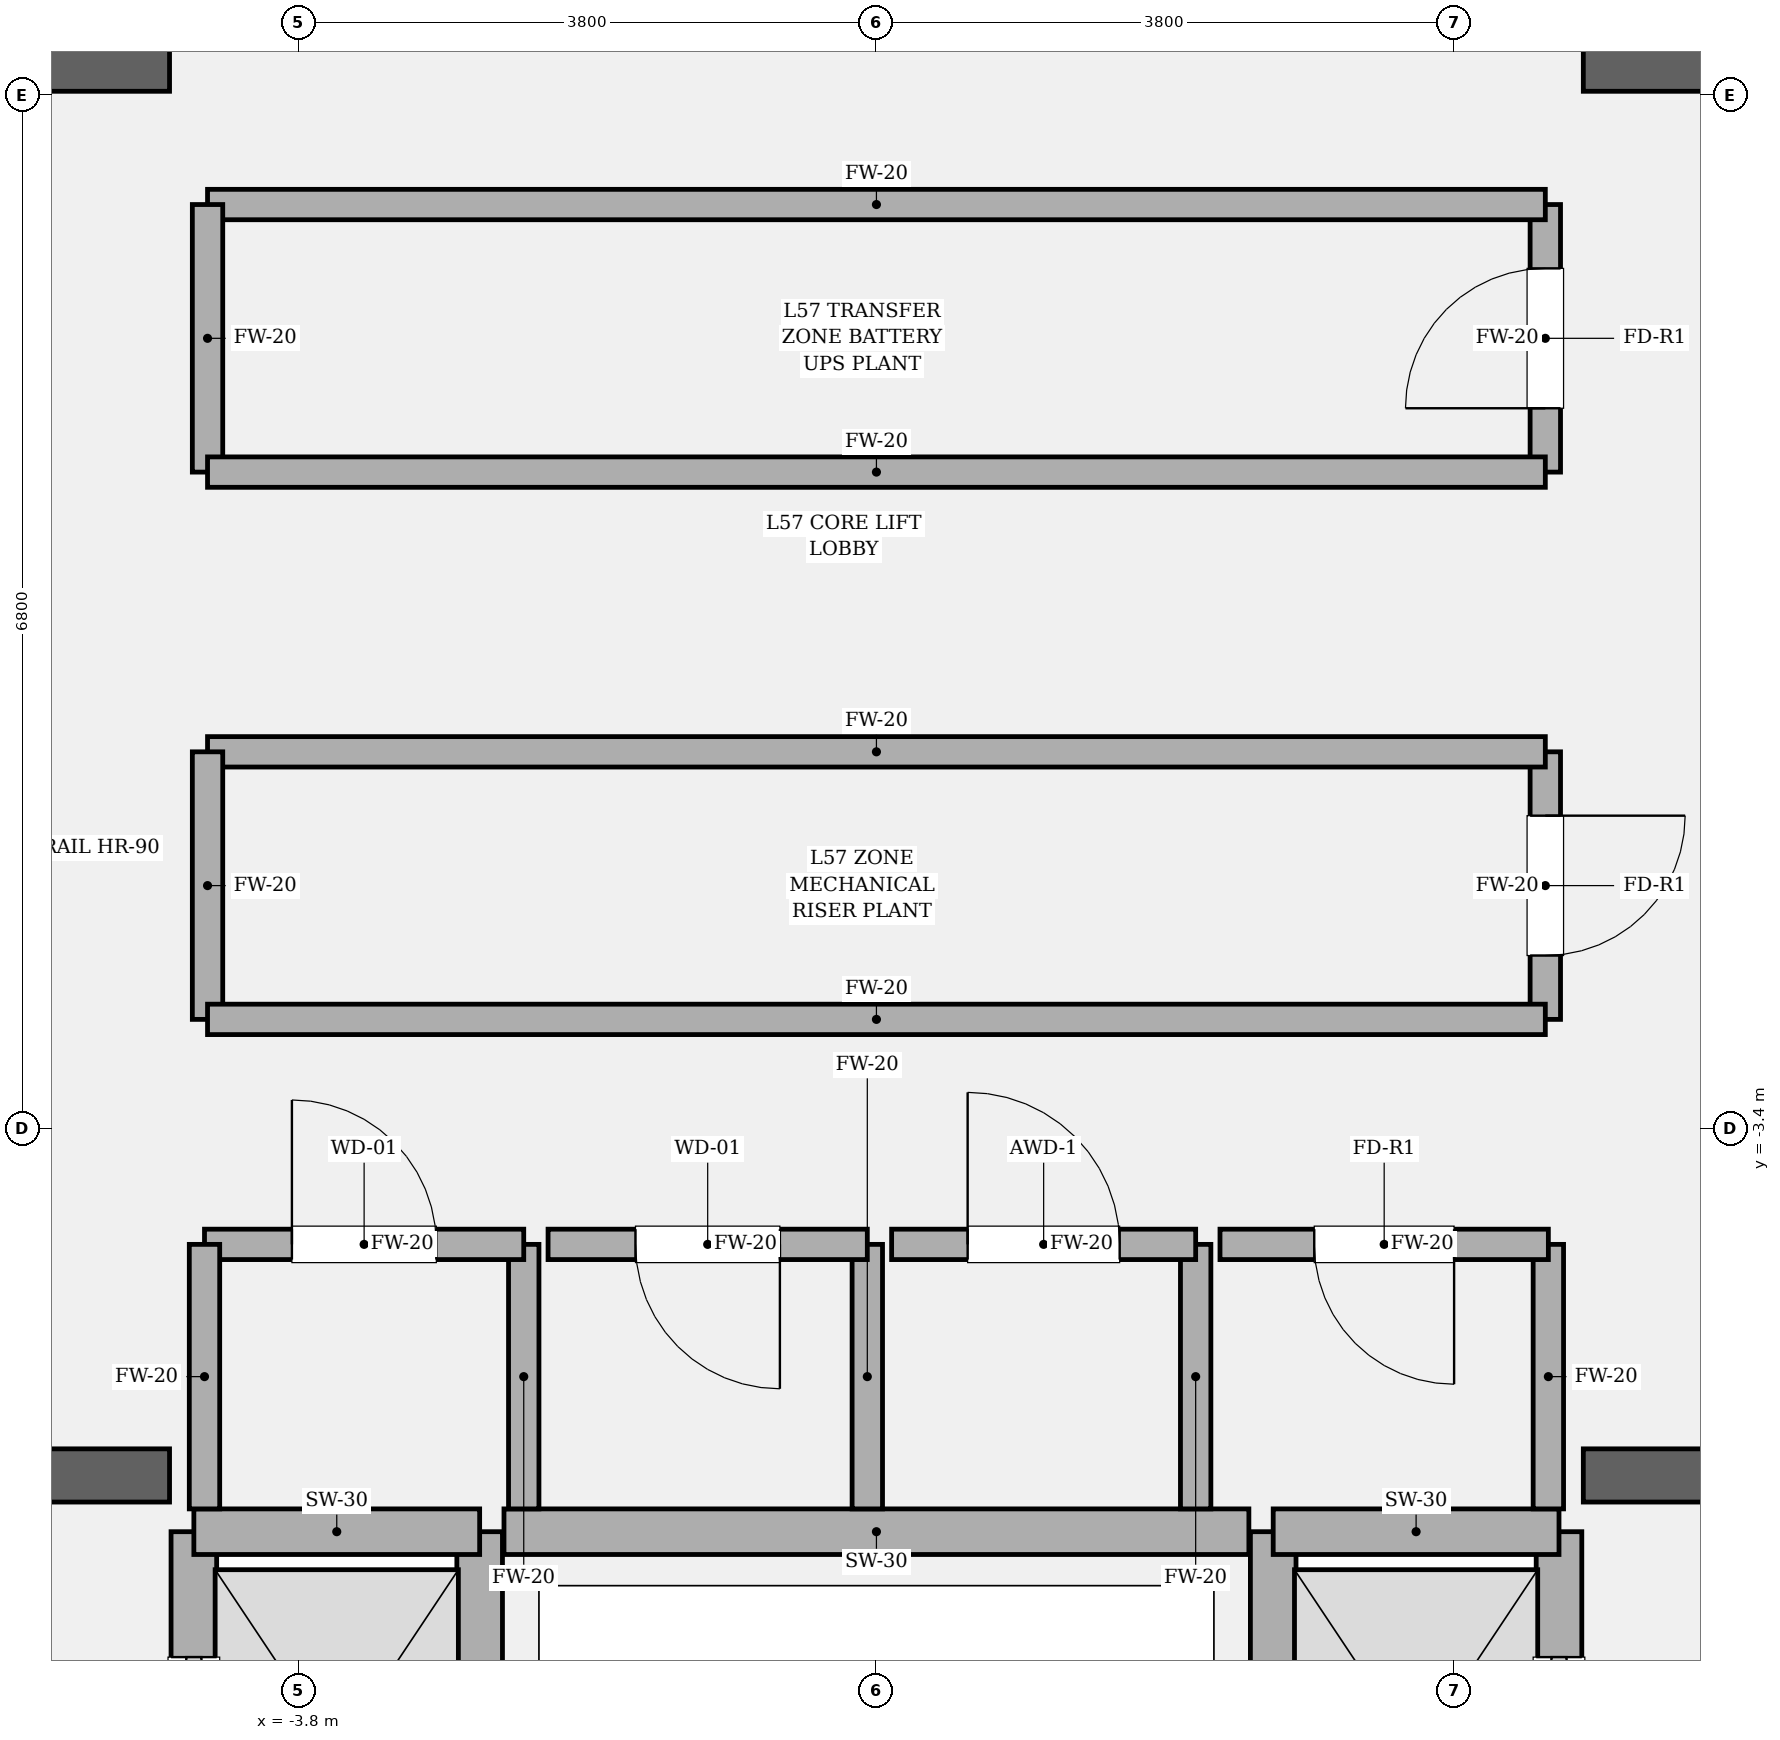
"""IFC4 building model, lengths in metres.
Left out: names, types, materials, properties, quantities, classifications, styles, units other than length and angle.
Written with IfcOpenShell. Run it as: python <this file> out.ifc"""

import sys

from ifc_helpers import new_model, si_unit, direction, frame, frame_2d, origin, place, context, subcontext, project, spatial, rectangle, extrude, element, fill, save


model = new_model("IFC4")
c1 = context("Model", 3, precision=1e-05, world=origin(), true_north=direction((0.0, 1.0)))
c2 = subcontext(c1, "Body", "Model", "MODEL_VIEW")
j1 = project(units=[si_unit("LENGTHUNIT", "METRE"), si_unit("PLANEANGLEUNIT", "RADIAN")], contexts=[c1])
p1 = place(None, origin())
s1 = spatial("IfcSite", under=j1, at=p1, CompositionType="ELEMENT")
p2 = place(p1, origin())
s2 = spatial("IfcBuilding", under=s1, at=p2, CompositionType="ELEMENT")
p3 = place(p2, frame((0.0, 0.0, 241.8)))
s3 = spatial("IfcBuildingStorey", under=s2, at=p3, CompositionType="ELEMENT", Elevation=241.8)
p4 = place(p3, frame((-9.925, -5.68, 0.0), z_axis=(0.0, 0.0, 1.0), x_axis=(1.0, 0.0, 0.0)))
e1 = element("IfcWall", 1, at=p4, inside=s3, PredefinedType="SOLIDWALL", context=c2, shape_type="SweptSolid", body=[
    extrude(rectangle(XDim=5.275, YDim=0.35, at=frame_2d((2.638, 0.0))), origin(), (0.0, 0.0, 1.0), 4.8),
])
p5 = place(p4, frame((1.385, 0.0, 0.0)))
e2 = element("IfcOpeningElement", 2, at=p5, cuts=e1, PredefinedType="OPENING", context=c2, shape_type="SweptSolid", body=[
    extrude(rectangle(XDim=1.18, YDim=2.2, at=frame_2d((0.59, 1.1))), frame((0.0, 0.185, 0.0), z_axis=(0.0, -1.0, 0.0), x_axis=(1.0, 0.0, 0.0)), (0.0, 0.0, 1.0), 0.37),
])
p6 = place(p3, frame((4.65, -5.68, 0.0), z_axis=(0.0, 0.0, 1.0), x_axis=(1.0, 0.0, 0.0)))
e3 = element("IfcWall", 3, at=p6, inside=s3, PredefinedType="SOLIDWALL", context=c2, shape_type="SweptSolid", body=[
    extrude(rectangle(XDim=5.275, YDim=0.35, at=frame_2d((2.638, 0.0))), origin(), (0.0, 0.0, 1.0), 4.8),
])
p7 = place(p6, frame((2.71, 0.0, 0.0)))
e4 = element("IfcOpeningElement", 4, at=p7, cuts=e3, PredefinedType="OPENING", context=c2, shape_type="SweptSolid", body=[
    extrude(rectangle(XDim=1.18, YDim=2.2, at=frame_2d((0.59, 1.1))), frame((0.0, 0.185, 0.0), z_axis=(0.0, -1.0, 0.0), x_axis=(1.0, 0.0, 0.0)), (0.0, 0.0, 1.0), 0.37),
])
for number, where, z_axis, x_axis in (
    (5, (-9.925, 3.6, 0.0), (0.0, 0.0, 1.0), (1.0, 0.0, 0.0)),
    (6, (4.65, 3.6, 0.0), (0.0, 0.0, 1.0), (1.0, 0.0, 0.0)),
):
    element("IfcWall", number, at=place(p3, frame(where, z_axis=z_axis, x_axis=x_axis)), inside=s3, PredefinedType="SOLIDWALL", context=c2, shape_type="SweptSolid", body=[
        extrude(rectangle(XDim=5.275, YDim=0.35, at=frame_2d((2.638, 0.0))), origin(), (0.0, 0.0, 1.0), 4.8),
    ])
p8 = place(p3, frame((-4.49, -8.82, 0.0), z_axis=(0.0, 0.0, 1.0), x_axis=(0.0, 1.0, 0.0)))
e7 = element("IfcWall", 7, at=p8, inside=s3, PredefinedType="SOLIDWALL", context=c2, shape_type="SweptSolid", body=[
    extrude(rectangle(XDim=2.77, YDim=0.3, at=frame_2d((1.385, 0.0))), origin(), (0.0, 0.0, 1.0), 4.54),
])
p9 = place(p8, frame((0.825, 0.0, 0.0)))
e8 = element("IfcOpeningElement", 8, at=p9, cuts=e7, PredefinedType="OPENING", context=c2, shape_type="SweptSolid", body=[
    extrude(rectangle(XDim=1.12, YDim=2.25, at=frame_2d((0.56, 1.125))), frame((0.0, 0.16, 0.0), z_axis=(0.0, -1.0, 0.0), x_axis=(1.0, 0.0, 0.0)), (0.0, 0.0, 1.0), 0.32),
])
p10 = place(p3, frame((-2.61, -8.82, 0.0), z_axis=(0.0, 0.0, 1.0), x_axis=(0.0, 1.0, 0.0)))
e9 = element("IfcWall", 9, at=p10, inside=s3, PredefinedType="SOLIDWALL", context=c2, shape_type="SweptSolid", body=[
    extrude(rectangle(XDim=2.77, YDim=0.3, at=frame_2d((1.385, 0.0))), origin(), (0.0, 0.0, 1.0), 4.54),
])
p11 = place(p3, frame((-4.49, -6.05, 0.0), z_axis=(0.0, 0.0, 1.0), x_axis=(1.0, 0.0, 0.0)))
e10 = element("IfcWall", 10, at=p11, inside=s3, PredefinedType="SOLIDWALL", context=c2, shape_type="SweptSolid", body=[
    extrude(rectangle(XDim=1.88, YDim=0.3, at=frame_2d((0.94, 0.0))), origin(), (0.0, 0.0, 1.0), 4.54),
])
p12 = place(p3, frame((4.49, -8.82, 0.0), z_axis=(0.0, 0.0, 1.0), x_axis=(0.0, 1.0, 0.0)))
e11 = element("IfcWall", 11, at=p12, inside=s3, PredefinedType="SOLIDWALL", context=c2, shape_type="SweptSolid", body=[
    extrude(rectangle(XDim=2.77, YDim=0.3, at=frame_2d((1.385, 0.0))), origin(), (0.0, 0.0, 1.0), 4.54),
])
p13 = place(p12, frame((0.825, 0.0, 0.0)))
e12 = element("IfcOpeningElement", 12, at=p13, cuts=e11, PredefinedType="OPENING", context=c2, shape_type="SweptSolid", body=[
    extrude(rectangle(XDim=1.12, YDim=2.25, at=frame_2d((0.56, 1.125))), frame((0.0, 0.16, 0.0), z_axis=(0.0, -1.0, 0.0), x_axis=(1.0, 0.0, 0.0)), (0.0, 0.0, 1.0), 0.32),
])
p14 = place(p3, frame((2.61, -8.82, 0.0), z_axis=(0.0, 0.0, 1.0), x_axis=(0.0, 1.0, 0.0)))
e13 = element("IfcWall", 13, at=p14, inside=s3, PredefinedType="SOLIDWALL", context=c2, shape_type="SweptSolid", body=[
    extrude(rectangle(XDim=2.77, YDim=0.3, at=frame_2d((1.385, 0.0))), origin(), (0.0, 0.0, 1.0), 4.54),
])
p15 = place(p3, frame((2.61, -6.05, 0.0), z_axis=(0.0, 0.0, 1.0), x_axis=(1.0, 0.0, 0.0)))
e14 = element("IfcWall", 14, at=p15, inside=s3, PredefinedType="SOLIDWALL", context=c2, shape_type="SweptSolid", body=[
    extrude(rectangle(XDim=1.88, YDim=0.3, at=frame_2d((0.94, 0.0))), origin(), (0.0, 0.0, 1.0), 4.54),
])
p16 = place(p3, frame((-2.45, -6.05, 0.0), z_axis=(0.0, 0.0, 1.0), x_axis=(1.0, 0.0, 0.0)))
e15 = element("IfcWall", 15, at=p16, inside=s3, PredefinedType="SOLIDWALL", context=c2, shape_type="SweptSolid", body=[
    extrude(rectangle(XDim=4.9, YDim=0.3, at=frame_2d((2.45, 0.0))), origin(), (0.0, 0.0, 1.0), 4.54),
])
p17 = place(p3, frame((-2.32, -5.9, 0.0), z_axis=(0.0, 0.0, 1.0), x_axis=(0.0, 1.0, 0.0)))
e16 = element("IfcWall", 16, at=p17, inside=s3, PredefinedType="SOLIDWALL", context=c2, shape_type="SweptSolid", body=[
    extrude(rectangle(XDim=1.74, YDim=0.2, at=frame_2d((0.87, 0.0))), origin(), (0.0, 0.0, 1.0), 4.54),
])
p18 = place(p3, frame((-2.32, -4.16, 0.0), z_axis=(0.0, 0.0, 1.0), x_axis=(-1.0, 0.0, 0.0)))
e17 = element("IfcWall", 17, at=p18, inside=s3, PredefinedType="SOLIDWALL", context=c2, shape_type="SweptSolid", body=[
    extrude(rectangle(XDim=2.1, YDim=0.2, at=frame_2d((1.05, 0.0))), origin(), (0.0, 0.0, 1.0), 4.54),
])
p19 = place(p18, frame((0.575, 0.0, 0.0)))
e18 = element("IfcOpeningElement", 18, at=p19, cuts=e17, PredefinedType="OPENING", context=c2, shape_type="SweptSolid", body=[
    extrude(rectangle(XDim=0.95, YDim=2.15, at=frame_2d((0.475, 1.075))), frame((0.0, 0.11, 0.0), z_axis=(0.0, -1.0, 0.0), x_axis=(1.0, 0.0, 0.0)), (0.0, 0.0, 1.0), 0.22),
])
for number, where, z_axis, x_axis in (
    (19, (-4.42, -4.16, 0.0), (0.0, 0.0, 1.0), (0.0, -1.0, 0.0)),
    (20, (-0.06, -5.9, 0.0), (0.0, 0.0, 1.0), (0.0, 1.0, 0.0)),
):
    element("IfcWall", number, at=place(p3, frame(where, z_axis=z_axis, x_axis=x_axis)), inside=s3, PredefinedType="SOLIDWALL", context=c2, shape_type="SweptSolid", body=[
        extrude(rectangle(XDim=1.74, YDim=0.2, at=frame_2d((0.87, 0.0))), origin(), (0.0, 0.0, 1.0), 4.54),
    ])
p20 = place(p3, frame((-0.06, -4.16, 0.0), z_axis=(0.0, 0.0, 1.0), x_axis=(-1.0, 0.0, 0.0)))
e21 = element("IfcWall", 21, at=p20, inside=s3, PredefinedType="SOLIDWALL", context=c2, shape_type="SweptSolid", body=[
    extrude(rectangle(XDim=2.1, YDim=0.2, at=frame_2d((1.05, 0.0))), origin(), (0.0, 0.0, 1.0), 4.54),
])
p21 = place(p20, frame((0.575, 0.0, 0.0)))
e22 = element("IfcOpeningElement", 22, at=p21, cuts=e21, PredefinedType="OPENING", context=c2, shape_type="SweptSolid", body=[
    extrude(rectangle(XDim=0.95, YDim=2.15, at=frame_2d((0.475, 1.075))), frame((0.0, 0.11, 0.0), z_axis=(0.0, -1.0, 0.0), x_axis=(1.0, 0.0, 0.0)), (0.0, 0.0, 1.0), 0.22),
])
p22 = place(p3, frame((2.1, -5.9, 0.0), z_axis=(0.0, 0.0, 1.0), x_axis=(0.0, 1.0, 0.0)))
e23 = element("IfcWall", 23, at=p22, inside=s3, PredefinedType="SOLIDWALL", context=c2, shape_type="SweptSolid", body=[
    extrude(rectangle(XDim=1.74, YDim=0.2, at=frame_2d((0.87, 0.0))), origin(), (0.0, 0.0, 1.0), 4.54),
])
p23 = place(p3, frame((2.1, -4.16, 0.0), z_axis=(0.0, 0.0, 1.0), x_axis=(-1.0, 0.0, 0.0)))
e24 = element("IfcWall", 24, at=p23, inside=s3, PredefinedType="SOLIDWALL", context=c2, shape_type="SweptSolid", body=[
    extrude(rectangle(XDim=2.0, YDim=0.2, at=frame_2d((1.0, 0.0))), origin(), (0.0, 0.0, 1.0), 4.54),
])
p24 = place(p23, frame((0.5, 0.0, 0.0)))
e25 = element("IfcOpeningElement", 25, at=p24, cuts=e24, PredefinedType="OPENING", context=c2, shape_type="SweptSolid", body=[
    extrude(rectangle(XDim=1.0, YDim=2.15, at=frame_2d((0.5, 1.075))), frame((0.0, 0.11, 0.0), z_axis=(0.0, -1.0, 0.0), x_axis=(1.0, 0.0, 0.0)), (0.0, 0.0, 1.0), 0.22),
])
p25 = place(p3, frame((4.42, -5.9, 0.0), z_axis=(0.0, 0.0, 1.0), x_axis=(0.0, 1.0, 0.0)))
e26 = element("IfcWall", 26, at=p25, inside=s3, PredefinedType="SOLIDWALL", context=c2, shape_type="SweptSolid", body=[
    extrude(rectangle(XDim=1.74, YDim=0.2, at=frame_2d((0.87, 0.0))), origin(), (0.0, 0.0, 1.0), 4.54),
])
p26 = place(p3, frame((4.42, -4.16, 0.0), z_axis=(0.0, 0.0, 1.0), x_axis=(-1.0, 0.0, 0.0)))
e27 = element("IfcWall", 27, at=p26, inside=s3, PredefinedType="SOLIDWALL", context=c2, shape_type="SweptSolid", body=[
    extrude(rectangle(XDim=2.16, YDim=0.2, at=frame_2d((1.08, 0.0))), origin(), (0.0, 0.0, 1.0), 4.54),
])
p27 = place(p26, frame((0.62, 0.0, 0.0)))
e28 = element("IfcOpeningElement", 28, at=p27, cuts=e27, PredefinedType="OPENING", context=c2, shape_type="SweptSolid", body=[
    extrude(rectangle(XDim=0.92, YDim=2.1, at=frame_2d((0.46, 1.05))), frame((0.0, 0.11, 0.0), z_axis=(0.0, -1.0, 0.0), x_axis=(1.0, 0.0, 0.0)), (0.0, 0.0, 1.0), 0.22),
])
p28 = place(p3, frame((4.4, -2.68, 0.0), z_axis=(0.0, 0.0, 1.0), x_axis=(0.0, 1.0, 0.0)))
e29 = element("IfcWall", 29, at=p28, inside=s3, PredefinedType="SOLIDWALL", context=c2, shape_type="SweptSolid", body=[
    extrude(rectangle(XDim=1.76, YDim=0.2, at=frame_2d((0.88, 0.0))), origin(), (0.0, 0.0, 1.0), 4.54),
])
p29 = place(p28, frame((0.42, 0.0, 0.0)))
e30 = element("IfcOpeningElement", 30, at=p29, cuts=e29, PredefinedType="OPENING", context=c2, shape_type="SweptSolid", body=[
    extrude(rectangle(XDim=0.92, YDim=2.1, at=frame_2d((0.46, 1.05))), frame((0.0, 0.11, 0.0), z_axis=(0.0, -1.0, 0.0), x_axis=(1.0, 0.0, 0.0)), (0.0, 0.0, 1.0), 0.22),
])
p30 = place(p3, frame((4.4, -0.92, 0.0), z_axis=(0.0, 0.0, 1.0), x_axis=(-1.0, 0.0, 0.0)))
e31 = element("IfcWall", 31, at=p30, inside=s3, PredefinedType="SOLIDWALL", context=c2, shape_type="SweptSolid", body=[
    extrude(rectangle(XDim=8.8, YDim=0.2, at=frame_2d((4.4, 0.0))), origin(), (0.0, 0.0, 1.0), 4.54),
])
p31 = place(p3, frame((-4.4, -0.92, 0.0), z_axis=(0.0, 0.0, 1.0), x_axis=(0.0, -1.0, 0.0)))
e32 = element("IfcWall", 32, at=p31, inside=s3, PredefinedType="SOLIDWALL", context=c2, shape_type="SweptSolid", body=[
    extrude(rectangle(XDim=1.76, YDim=0.2, at=frame_2d((0.88, 0.0))), origin(), (0.0, 0.0, 1.0), 4.54),
])
p32 = place(p3, frame((-4.4, -2.68, 0.0), z_axis=(0.0, 0.0, 1.0), x_axis=(1.0, 0.0, 0.0)))
e33 = element("IfcWall", 33, at=p32, inside=s3, PredefinedType="SOLIDWALL", context=c2, shape_type="SweptSolid", body=[
    extrude(rectangle(XDim=8.8, YDim=0.2, at=frame_2d((4.4, 0.0))), origin(), (0.0, 0.0, 1.0), 4.54),
])
p33 = place(p3, frame((4.4, 0.92, 0.0), z_axis=(0.0, 0.0, 1.0), x_axis=(0.0, 1.0, 0.0)))
e34 = element("IfcWall", 34, at=p33, inside=s3, PredefinedType="SOLIDWALL", context=c2, shape_type="SweptSolid", body=[
    extrude(rectangle(XDim=1.76, YDim=0.2, at=frame_2d((0.88, 0.0))), origin(), (0.0, 0.0, 1.0), 4.54),
])
p34 = place(p33, frame((0.42, 0.0, 0.0)))
e35 = element("IfcOpeningElement", 35, at=p34, cuts=e34, PredefinedType="OPENING", context=c2, shape_type="SweptSolid", body=[
    extrude(rectangle(XDim=0.92, YDim=2.1, at=frame_2d((0.46, 1.05))), frame((0.0, 0.11, 0.0), z_axis=(0.0, -1.0, 0.0), x_axis=(1.0, 0.0, 0.0)), (0.0, 0.0, 1.0), 0.22),
])
p35 = place(p3, frame((4.4, 2.68, 0.0), z_axis=(0.0, 0.0, 1.0), x_axis=(-1.0, 0.0, 0.0)))
e36 = element("IfcWall", 36, at=p35, inside=s3, PredefinedType="SOLIDWALL", context=c2, shape_type="SweptSolid", body=[
    extrude(rectangle(XDim=8.8, YDim=0.2, at=frame_2d((4.4, 0.0))), origin(), (0.0, 0.0, 1.0), 4.54),
])
p36 = place(p3, frame((-4.4, 2.68, 0.0), z_axis=(0.0, 0.0, 1.0), x_axis=(0.0, -1.0, 0.0)))
e37 = element("IfcWall", 37, at=p36, inside=s3, PredefinedType="SOLIDWALL", context=c2, shape_type="SweptSolid", body=[
    extrude(rectangle(XDim=1.76, YDim=0.2, at=frame_2d((0.88, 0.0))), origin(), (0.0, 0.0, 1.0), 4.54),
])
p37 = place(p3, frame((-4.4, 0.92, 0.0), z_axis=(0.0, 0.0, 1.0), x_axis=(1.0, 0.0, 0.0)))
e38 = element("IfcWall", 38, at=p37, inside=s3, PredefinedType="SOLIDWALL", context=c2, shape_type="SweptSolid", body=[
    extrude(rectangle(XDim=8.8, YDim=0.2, at=frame_2d((4.4, 0.0))), origin(), (0.0, 0.0, 1.0), 4.54),
])
p38 = place(p9, origin())
e39 = element("IfcDoor", 39, at=p38, inside=s3, OperationType="SLIDING_TO_LEFT", PredefinedType="DOOR", context=c2, shape_type="SweptSolid", body=[
    extrude(rectangle(XDim=1.12, YDim=2.25, at=frame_2d((0.56, 1.125))), frame((0.0, 0.025, 0.0), z_axis=(0.0, -1.0, 0.0), x_axis=(1.0, 0.0, 0.0)), (0.0, 0.0, 1.0), 0.05),
])
fill(e8, e39)
p39 = place(p13, origin())
e40 = element("IfcDoor", 40, at=p39, inside=s3, OperationType="SLIDING_TO_RIGHT", PredefinedType="DOOR", context=c2, shape_type="SweptSolid", body=[
    extrude(rectangle(XDim=1.12, YDim=2.25, at=frame_2d((0.56, 1.125))), frame((0.0, 0.025, 0.0), z_axis=(0.0, -1.0, 0.0), x_axis=(1.0, 0.0, 0.0)), (0.0, 0.0, 1.0), 0.05),
])
fill(e12, e40)
p40 = place(p19, origin())
e41 = element("IfcDoor", 41, at=p40, inside=s3, OperationType="SINGLE_SWING_RIGHT", PredefinedType="DOOR", context=c2, shape_type="SweptSolid", body=[
    extrude(rectangle(XDim=0.95, YDim=2.15, at=frame_2d((0.475, 1.075))), frame((0.0, 0.025, 0.0), z_axis=(0.0, -1.0, 0.0), x_axis=(1.0, 0.0, 0.0)), (0.0, 0.0, 1.0), 0.05),
])
fill(e18, e41)
p41 = place(p21, origin())
e42 = element("IfcDoor", 42, at=p41, inside=s3, OperationType="SINGLE_SWING_LEFT", PredefinedType="DOOR", context=c2, shape_type="SweptSolid", body=[
    extrude(rectangle(XDim=0.95, YDim=2.15, at=frame_2d((0.475, 1.075))), frame((0.0, 0.025, 0.0), z_axis=(0.0, -1.0, 0.0), x_axis=(1.0, 0.0, 0.0)), (0.0, 0.0, 1.0), 0.05),
])
fill(e22, e42)
p42 = place(p24, origin())
e43 = element("IfcDoor", 43, at=p42, inside=s3, OperationType="SINGLE_SWING_RIGHT", PredefinedType="DOOR", context=c2, shape_type="SweptSolid", body=[
    extrude(rectangle(XDim=1.0, YDim=2.15, at=frame_2d((0.5, 1.075))), frame((0.0, 0.025, 0.0), z_axis=(0.0, -1.0, 0.0), x_axis=(1.0, 0.0, 0.0)), (0.0, 0.0, 1.0), 0.05),
])
fill(e25, e43)
p43 = place(p27, origin())
e44 = element("IfcDoor", 44, at=p43, inside=s3, OperationType="SINGLE_SWING_LEFT", PredefinedType="DOOR", context=c2, shape_type="SweptSolid", body=[
    extrude(rectangle(XDim=0.92, YDim=2.1, at=frame_2d((0.46, 1.05))), frame((0.0, 0.025, 0.0), z_axis=(0.0, -1.0, 0.0), x_axis=(1.0, 0.0, 0.0)), (0.0, 0.0, 1.0), 0.05),
])
fill(e28, e44)
p44 = place(p29, origin())
e45 = element("IfcDoor", 45, at=p44, inside=s3, OperationType="SINGLE_SWING_RIGHT", PredefinedType="DOOR", context=c2, shape_type="SweptSolid", body=[
    extrude(rectangle(XDim=0.92, YDim=2.1, at=frame_2d((0.46, 1.05))), frame((0.0, 0.025, 0.0), z_axis=(0.0, -1.0, 0.0), x_axis=(1.0, 0.0, 0.0)), (0.0, 0.0, 1.0), 0.05),
])
fill(e30, e45)
p45 = place(p34, origin())
e46 = element("IfcDoor", 46, at=p45, inside=s3, OperationType="SINGLE_SWING_LEFT", PredefinedType="DOOR", context=c2, shape_type="SweptSolid", body=[
    extrude(rectangle(XDim=0.92, YDim=2.1, at=frame_2d((0.46, 1.05))), frame((0.0, 0.025, 0.0), z_axis=(0.0, -1.0, 0.0), x_axis=(1.0, 0.0, 0.0)), (0.0, 0.0, 1.0), 0.05),
])
fill(e35, e46)
save(model, sys.argv[1])
